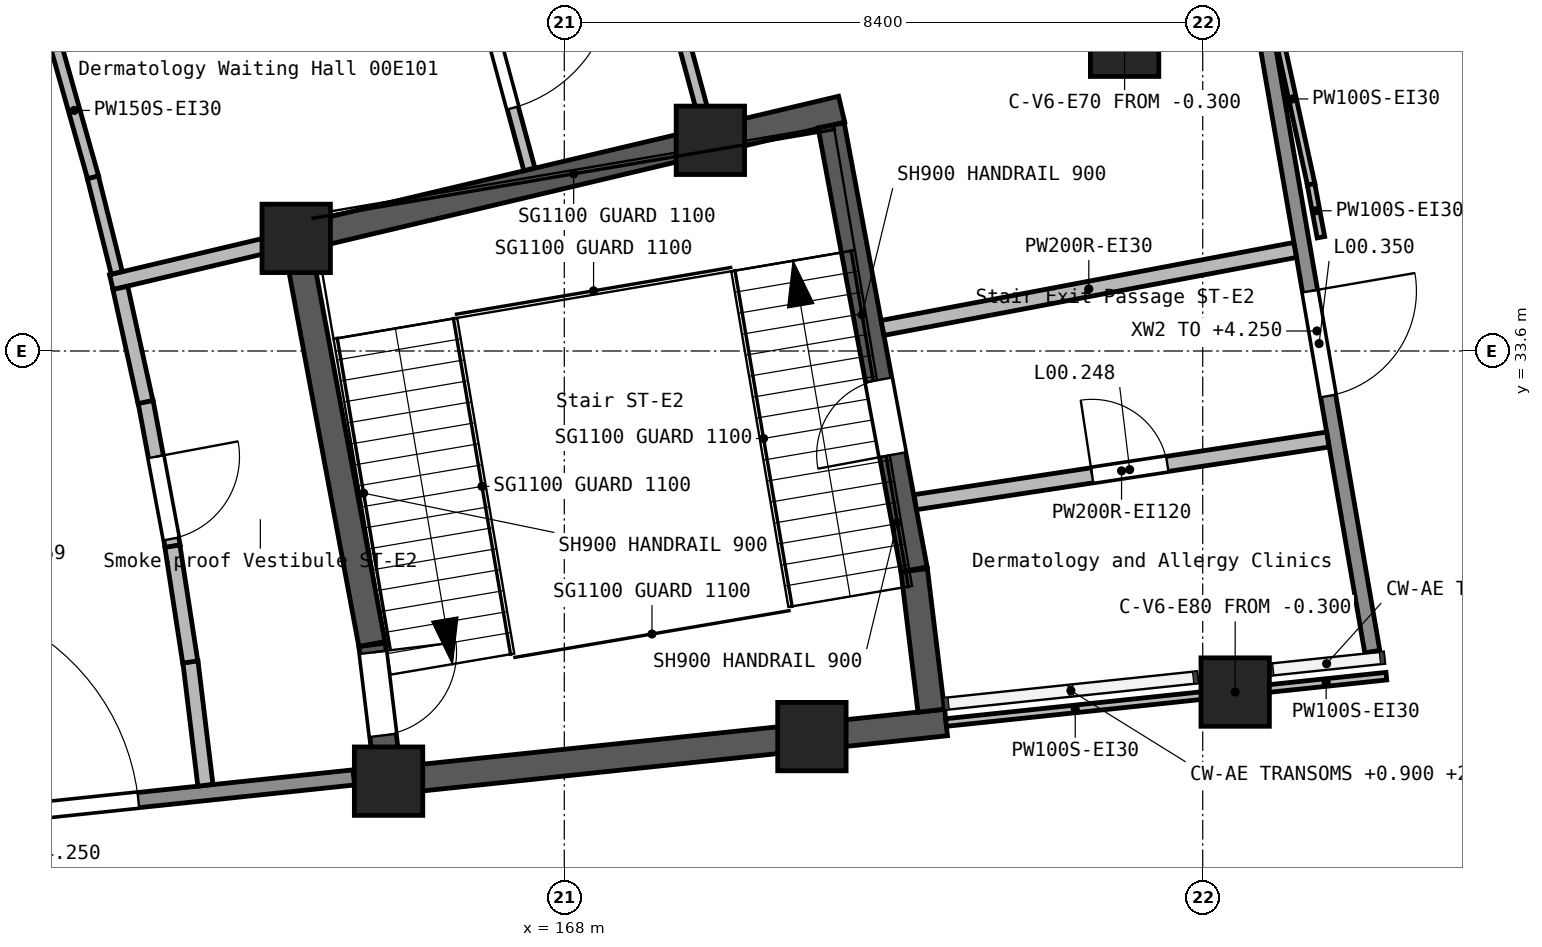
"""IFC4 building model, lengths in metres.
Left out: names, types, materials, properties, quantities, classifications, styles, units other than length and angle.
Written with IfcOpenShell. Run it as: python <this file> out.ifc"""

import sys

from ifc_helpers import new_model, si_unit, direction, frame, frame_2d, origin, origin_2d, place, context, subcontext, project, spatial, rectangle, extrude, element, fill, save


model = new_model("IFC4")
c1 = context("Model", 3, precision=1e-05, world=origin(), true_north=direction((0.0, 1.0)))
c2 = subcontext(c1, "Body", "Model", "MODEL_VIEW")
j1 = project(units=[si_unit("LENGTHUNIT", "METRE"), si_unit("PLANEANGLEUNIT", "RADIAN")], contexts=[c1])
p1 = place(None, origin())
s1 = spatial("IfcSite", under=j1, at=p1, CompositionType="ELEMENT")
p2 = place(p1, origin())
s2 = spatial("IfcBuilding", under=s1, at=p2, CompositionType="ELEMENT")
p3 = place(p2, origin())
s3 = spatial("IfcBuildingStorey", under=s2, at=p3, CompositionType="ELEMENT", Elevation=0.0)
for number, where, z_axis, x_axis in (
    (1, (164.473, 35.082, -0.3), (0.0, 0.0, 1.0), (1.0, 0.0, 0.0)),
    (2, (165.688, 27.941, -0.3), (0.0, 0.0, 1.0), (1.0, 0.0, 0.0)),
    (3, (169.922, 36.372, -0.3), (0.0, 0.0, 1.0), (1.0, 0.0, 0.0)),
    (4, (171.258, 28.527, -0.3), (0.0, 0.0, 1.0), (1.0, 0.0, 0.0)),
    (5, (175.372, 37.662, -0.3), (0.0, 0.0, 1.0), (1.0, 0.0, 0.0)),
    (6, (176.827, 29.113, -0.3), (0.0, 0.0, 1.0), (1.0, 0.0, 0.0)),
):
    element("IfcColumn", number, at=place(p3, frame(where, z_axis=z_axis, x_axis=x_axis)), inside=s3, PredefinedType="COLUMN", context=c2, shape_type="SweptSolid", body=[
        extrude(rectangle(XDim=0.9, YDim=0.9, at=origin_2d()), origin(), (0.0, 0.0, 1.0), 5.7),
    ])
p4 = place(p3, frame((164.303, 35.042, -0.3), z_axis=(0.0, 0.0, 1.0), x_axis=(0.973093454504, 0.230410782737, 0.0)))
e7 = element("IfcWall", 7, at=p4, inside=s3, PredefinedType="SHEAR", context=c2, shape_type="SweptSolid", body=[
    extrude(rectangle(XDim=7.55, YDim=0.35, at=frame_2d((3.775, 0.0))), origin(), (0.0, 0.0, 1.0), 5.7),
])
p5 = place(p3, frame((165.471, 29.734, -0.3), z_axis=(0.0, 0.0, 1.0), x_axis=(0.12025777275, -0.992742699844, 0.0)))
e8 = element("IfcWall", 8, at=p5, inside=s3, PredefinedType="SHEAR", context=c2, shape_type="SweptSolid", body=[
    extrude(rectangle(XDim=1.981, YDim=0.35, at=frame_2d((0.991, 0.0))), origin(), (0.0, 0.0, 1.0), 5.7),
])
p6 = place(p5, frame((0.1, 0.0, 0.3)))
e9 = element("IfcOpeningElement", 9, at=p6, cuts=e8, PredefinedType="OPENING", context=c2, shape_type="SweptSolid", body=[
    extrude(rectangle(XDim=1.1, YDim=2.1, at=frame_2d((0.55, 1.05))), frame((0.0, 0.185, 0.0), z_axis=(0.0, -1.0, 0.0), x_axis=(1.0, 0.0, 0.0)), (0.0, 0.0, 1.0), 0.37),
])
p7 = place(p3, frame((165.469, 29.746, -0.3), z_axis=(0.0, 0.0, 1.0), x_axis=(-0.183471964923, 0.98302494276, 0.0)))
e10 = element("IfcWall", 10, at=p7, inside=s3, PredefinedType="SHEAR", context=c2, shape_type="SweptSolid", body=[
    extrude(rectangle(XDim=5.253, YDim=0.35, at=frame_2d((2.627, 0.0))), origin(), (0.0, 0.0, 1.0), 5.7),
])
p8 = place(p3, frame((165.862, 27.959, -0.3), z_axis=(0.0, 0.0, 1.0), x_axis=(0.99451418157, 0.104601829128, 0.0)))
e11 = element("IfcWall", 11, at=p8, inside=s3, PredefinedType="SHEAR", context=c2, shape_type="SweptSolid", body=[
    extrude(rectangle(XDim=7.2, YDim=0.35, at=frame_2d((3.6, 0.0))), origin(), (0.0, 0.0, 1.0), 5.7),
])
p9 = place(p3, frame((172.604, 30.716, -0.3), z_axis=(0.0, 0.0, 1.0), x_axis=(0.120401871373, -0.992725233572, 0.0)))
e12 = element("IfcWall", 12, at=p9, inside=s3, PredefinedType="SHEAR", context=c2, shape_type="SweptSolid", body=[
    extrude(rectangle(XDim=1.861, YDim=0.35, at=frame_2d((0.931, 0.0))), origin(), (0.0, 0.0, 1.0), 5.7),
])
p10 = place(p3, frame((172.602, 30.727, -0.3), z_axis=(0.0, 0.0, 1.0), x_axis=(-0.18353204361, 0.983013727762, 0.0)))
e13 = element("IfcWall", 13, at=p10, inside=s3, PredefinedType="SHEAR", context=c2, shape_type="SweptSolid", body=[
    extrude(rectangle(XDim=5.944, YDim=0.35, at=frame_2d((2.972, 0.0))), origin(), (0.0, 0.0, 1.0), 5.7),
])
p11 = place(p10, frame((1.535, 0.0, 0.3)))
e14 = element("IfcOpeningElement", 14, at=p11, cuts=e13, PredefinedType="OPENING", context=c2, shape_type="SweptSolid", body=[
    extrude(rectangle(XDim=1.0, YDim=2.1, at=frame_2d((0.5, 1.05))), frame((0.0, 0.185, 0.0), z_axis=(0.0, -1.0, 0.0), x_axis=(1.0, 0.0, 0.0)), (0.0, 0.0, 1.0), 0.37),
])
p12 = place(p3, frame((156.578, 27.08, 0.0), z_axis=(0.0, 0.0, 1.0), x_axis=(0.994515443337, 0.10458983203, 0.0)))
e15 = element("IfcWall", 15, at=p12, inside=s3, PredefinedType="STANDARD", context=c2, shape_type="SweptSolid", body=[
    extrude(rectangle(XDim=8.7, YDim=0.2, at=frame_2d((4.35, 0.0))), origin(), (0.0, 0.0, 1.0), 4.25),
])
p13 = place(p12, frame((2.85, 0.0, 0.0)))
e16 = element("IfcOpeningElement", 16, at=p13, cuts=e15, PredefinedType="OPENING", context=c2, shape_type="SweptSolid", body=[
    extrude(rectangle(XDim=3.0, YDim=2.4, at=frame_2d((1.5, 1.2))), frame((0.0, 0.11, 0.0), z_axis=(0.0, -1.0, 0.0), x_axis=(1.0, 0.0, 0.0)), (0.0, 0.0, 1.0), 0.22),
])
p14 = place(p3, frame((177.174, 38.082, 0.0), z_axis=(0.0, 0.0, 1.0), x_axis=(0.17017618712, -0.985413651893, 0.0)))
e17 = element("IfcWall", 17, at=p14, inside=s3, PredefinedType="STANDARD", context=c2, shape_type="SweptSolid", body=[
    extrude(rectangle(XDim=8.562, YDim=0.2, at=frame_2d((4.281, 0.0))), origin(), (0.0, 0.0, 1.0), 4.25),
])
p15 = place(p14, frame((3.749, 0.0, 0.0)))
e18 = element("IfcOpeningElement", 18, at=p15, cuts=e17, PredefinedType="OPENING", context=c2, shape_type="SweptSolid", body=[
    extrude(rectangle(XDim=1.4, YDim=2.1, at=frame_2d((0.7, 1.05))), frame((0.0, 0.11, 0.0), z_axis=(0.0, -1.0, 0.0), x_axis=(1.0, 0.0, 0.0)), (0.0, 0.0, 1.0), 0.22),
])
p16 = place(p3, frame((172.618, 31.611, 0.0), z_axis=(0.0, 0.0, 1.0), x_axis=(0.988678146595, 0.150051732563, 0.0)))
e19 = element("IfcWall", 19, at=p16, inside=s3, PredefinedType="SOLIDWALL", context=c2, shape_type="SweptSolid", body=[
    extrude(rectangle(XDim=5.49, YDim=0.2, at=frame_2d((2.745, 0.0))), origin(), (0.0, 0.0, 1.0), 5.05),
])
p17 = place(p16, frame((2.353, 0.0, 0.0)))
e20 = element("IfcOpeningElement", 20, at=p17, cuts=e19, PredefinedType="OPENING", context=c2, shape_type="SweptSolid", body=[
    extrude(rectangle(XDim=1.0, YDim=2.1, at=frame_2d((0.5, 1.05))), frame((0.0, 0.11, 0.0), z_axis=(0.0, -1.0, 0.0), x_axis=(1.0, 0.0, 0.0)), (0.0, 0.0, 1.0), 0.22),
])
p18 = place(p3, frame((172.187, 33.904, 0.0), z_axis=(0.0, 0.0, 1.0), x_axis=(0.982623653884, 0.185609145325, 0.0)))
e21 = element("IfcWall", 21, at=p18, inside=s3, PredefinedType="SOLIDWALL", context=c2, shape_type="SweptSolid", body=[
    extrude(rectangle(XDim=5.524, YDim=0.2, at=frame_2d((2.762, 0.0))), origin(), (0.0, 0.0, 1.0), 5.05),
])
p19 = place(p3, frame((162.04, 34.506, 0.0), z_axis=(0.0, 0.0, 1.0), x_axis=(0.973117236519, 0.230310321066, 0.0)))
e22 = element("IfcWall", 22, at=p19, inside=s3, PredefinedType="SOLIDWALL", context=c2, shape_type="SweptSolid", body=[
    extrude(rectangle(XDim=2.066, YDim=0.2, at=frame_2d((1.033, 0.0))), origin(), (0.0, 0.0, 1.0), 5.05),
])
p20 = place(p3, frame((163.081, 29.512, 0.0), z_axis=(0.0, 0.0, 1.0), x_axis=(0.120326914639, -0.992734321767, 0.0)))
e23 = element("IfcWall", 23, at=p20, inside=s3, PredefinedType="SOLIDWALL", context=c2, shape_type="SweptSolid", body=[
    extrude(rectangle(XDim=1.637, YDim=0.2, at=frame_2d((0.819, 0.0))), origin(), (0.0, 0.0, 1.0), 5.05),
])
p21 = place(p3, frame((162.492, 32.932, 0.0), z_axis=(0.0, 0.0, 1.0), x_axis=(0.183778259652, -0.982967726469, 0.0)))
e24 = element("IfcWall", 24, at=p21, inside=s3, PredefinedType="SOLIDWALL", context=c2, shape_type="SweptSolid", body=[
    extrude(rectangle(XDim=1.936, YDim=0.2, at=frame_2d((0.968, 0.0))), origin(), (0.0, 0.0, 1.0), 5.05),
])
p22 = place(p21, frame((0.736, 0.0, 0.0)))
e25 = element("IfcOpeningElement", 25, at=p22, cuts=e24, PredefinedType="OPENING", context=c2, shape_type="SweptSolid", body=[
    extrude(rectangle(XDim=1.1, YDim=2.1, at=frame_2d((0.55, 1.05))), frame((0.0, 0.11, 0.0), z_axis=(0.0, -1.0, 0.0), x_axis=(1.0, 0.0, 0.0)), (0.0, 0.0, 1.0), 0.22),
])
p23 = place(p3, frame((162.159, 34.43, 0.0), z_axis=(0.0, 0.0, 1.0), x_axis=(0.215079958229, -0.976596442533, 0.0)))
e26 = element("IfcWall", 26, at=p23, inside=s3, PredefinedType="SOLIDWALL", context=c2, shape_type="SweptSolid", body=[
    extrude(rectangle(XDim=1.537, YDim=0.2, at=frame_2d((0.769, 0.0))), origin(), (0.0, 0.0, 1.0), 5.05),
])
p24 = place(p3, frame((162.844, 31.032, 0.0), z_axis=(0.0, 0.0, 1.0), x_axis=(0.152211909299, -0.9883478814, 0.0)))
e27 = element("IfcWall", 27, at=p24, inside=s3, PredefinedType="SOLIDWALL", context=c2, shape_type="SweptSolid", body=[
    extrude(rectangle(XDim=1.542, YDim=0.2, at=frame_2d((0.771, 0.0))), origin(), (0.0, 0.0, 1.0), 5.05),
])
p25 = place(p3, frame((168.862, 40.287, 0.0), z_axis=(0.0, 0.0, 1.0), x_axis=(0.261268938462, -0.965266047157, 0.0)))
e28 = element("IfcWall", 28, at=p25, inside=s3, PredefinedType="PARTITIONING", context=c2, shape_type="SweptSolid", body=[
    extrude(rectangle(XDim=3.622, YDim=0.15, at=frame_2d((1.811, 0.0))), origin(), (0.0, 0.0, 1.0), 5.05),
])
p26 = place(p25, frame((1.566, 0.0, 0.0)))
e29 = element("IfcOpeningElement", 29, at=p26, cuts=e28, PredefinedType="OPENING", context=c2, shape_type="SweptSolid", body=[
    extrude(rectangle(XDim=1.0, YDim=2.1, at=frame_2d((0.5, 1.05))), frame((0.0, 0.085, 0.0), z_axis=(0.0, -1.0, 0.0), x_axis=(1.0, 0.0, 0.0)), (0.0, 0.0, 1.0), 0.17),
])
p27 = place(p3, frame((166.567, 39.586, 0.0), z_axis=(0.0, 0.0, 1.0), x_axis=(0.261225938755, -0.965277684877, 0.0)))
e30 = element("IfcWall", 30, at=p27, inside=s3, PredefinedType="PARTITIONING", context=c2, shape_type="SweptSolid", body=[
    extrude(rectangle(XDim=3.725, YDim=0.15, at=frame_2d((1.863, 0.0))), origin(), (0.0, 0.0, 1.0), 5.05),
])
p28 = place(p27, frame((1.089, 0.0, 0.0)))
e31 = element("IfcOpeningElement", 31, at=p28, cuts=e30, PredefinedType="OPENING", context=c2, shape_type="SweptSolid", body=[
    extrude(rectangle(XDim=1.8, YDim=2.1, at=frame_2d((0.9, 1.05))), frame((0.0, 0.085, 0.0), z_axis=(0.0, -1.0, 0.0), x_axis=(1.0, 0.0, 0.0)), (0.0, 0.0, 1.0), 0.17),
])
p29 = place(p3, frame((161.302, 37.647, 0.0), z_axis=(0.0, 0.0, 1.0), x_axis=(0.271536076628, -0.962428261789, 0.0)))
e32 = element("IfcWall", 32, at=p29, inside=s3, PredefinedType="PARTITIONING", context=c2, shape_type="SweptSolid", body=[
    extrude(rectangle(XDim=1.833, YDim=0.15, at=frame_2d((0.917, 0.0))), origin(), (0.0, 0.0, 1.0), 5.05),
])
p30 = place(p3, frame((161.798, 35.884, 0.0), z_axis=(0.0, 0.0, 1.0), x_axis=(0.243023571224, -0.970020383203, 0.0)))
e33 = element("IfcWall", 33, at=p30, inside=s3, PredefinedType="PARTITIONING", context=c2, shape_type="SweptSolid", body=[
    extrude(rectangle(XDim=1.295, YDim=0.15, at=frame_2d((0.647, 0.0))), origin(), (0.0, 0.0, 1.0), 5.05),
])
p31 = place(p3, frame((173.023, 28.712, 0.0), z_axis=(0.0, 0.0, 1.0), x_axis=(0.994508975148, 0.104651317957, 0.0)))
e34 = element("IfcWall", 34, at=p31, inside=s3, PredefinedType="PARTITIONING", context=c2, shape_type="SweptSolid", body=[
    extrude(rectangle(XDim=3.418, YDim=0.1, at=frame_2d((1.709, 0.0))), origin(), (0.0, 0.0, 1.0), 5.05),
])
p32 = place(p3, frame((177.232, 29.155, 0.0), z_axis=(0.0, 0.0, 1.0), x_axis=(0.994502932517, 0.104708725591, 0.0)))
e35 = element("IfcWall", 35, at=p32, inside=s3, PredefinedType="PARTITIONING", context=c2, shape_type="SweptSolid", body=[
    extrude(rectangle(XDim=1.593, YDim=0.1, at=frame_2d((0.796, 0.0))), origin(), (0.0, 0.0, 1.0), 5.05),
])
p33 = place(p3, frame((177.336, 38.04, 0.0), z_axis=(0.0, 0.0, 1.0), x_axis=(0.213187334012, -0.977011341089, 0.0)))
e36 = element("IfcWall", 36, at=p33, inside=s3, PredefinedType="PARTITIONING", context=c2, shape_type="SweptSolid", body=[
    extrude(rectangle(XDim=2.301, YDim=0.1, at=frame_2d((1.15, 0.0))), origin(), (0.0, 0.0, 1.0), 5.05),
])
p34 = place(p3, frame((177.825, 35.793, 0.0), z_axis=(0.0, 0.0, 1.0), x_axis=(0.184038826222, -0.982918974505, 0.0)))
e37 = element("IfcWall", 37, at=p34, inside=s3, PredefinedType="PARTITIONING", context=c2, shape_type="SweptSolid", body=[
    extrude(rectangle(XDim=0.708, YDim=0.1, at=frame_2d((0.354, 0.0))), origin(), (0.0, 0.0, 1.0), 5.05),
])
p35 = place(p13, frame((3.0, 0.0, 0.0), z_axis=(0.0, 0.0, 1.0), x_axis=(-1.0, 0.0, 0.0)))
e38 = element("IfcDoor", 38, at=p35, inside=s3, OperationType="SINGLE_SWING_LEFT", PredefinedType="DOOR", context=c2, shape_type="SweptSolid", body=[
    extrude(rectangle(XDim=3.0, YDim=2.4, at=frame_2d((1.5, 1.2))), frame((0.0, 0.025, 0.0), z_axis=(0.0, -1.0, 0.0), x_axis=(1.0, 0.0, 0.0)), (0.0, 0.0, 1.0), 0.05),
])
fill(e16, e38)
p36 = place(p15, origin())
e39 = element("IfcDoor", 39, at=p36, inside=s3, OperationType="SINGLE_SWING_LEFT", PredefinedType="DOOR", context=c2, shape_type="SweptSolid", body=[
    extrude(rectangle(XDim=1.4, YDim=2.1, at=frame_2d((0.7, 1.05))), frame((0.0, 0.025, 0.0), z_axis=(0.0, -1.0, 0.0), x_axis=(1.0, 0.0, 0.0)), (0.0, 0.0, 1.0), 0.05),
])
fill(e18, e39)
p37 = place(p28, origin())
e40 = element("IfcDoor", 40, at=p37, inside=s3, OperationType="DOUBLE_DOOR_SINGLE_SWING", PredefinedType="DOOR", context=c2, shape_type="SweptSolid", body=[
    extrude(rectangle(XDim=1.8, YDim=2.1, at=frame_2d((0.9, 1.05))), frame((0.0, 0.025, 0.0), z_axis=(0.0, -1.0, 0.0), x_axis=(1.0, 0.0, 0.0)), (0.0, 0.0, 1.0), 0.05),
])
fill(e31, e40)
p38 = place(p11, frame((1.0, 0.0, 0.0), z_axis=(0.0, 0.0, 1.0), x_axis=(-1.0, 0.0, 0.0)))
e41 = element("IfcDoor", 41, at=p38, inside=s3, OperationType="SINGLE_SWING_RIGHT", PredefinedType="DOOR", context=c2, shape_type="SweptSolid", body=[
    extrude(rectangle(XDim=1.0, YDim=2.1, at=frame_2d((0.5, 1.05))), frame((0.0, 0.025, 0.0), z_axis=(0.0, -1.0, 0.0), x_axis=(1.0, 0.0, 0.0)), (0.0, 0.0, 1.0), 0.05),
])
fill(e14, e41)
p39 = place(p17, origin())
e42 = element("IfcDoor", 42, at=p39, inside=s3, OperationType="SINGLE_SWING_RIGHT", PredefinedType="DOOR", context=c2, shape_type="SweptSolid", body=[
    extrude(rectangle(XDim=1.0, YDim=2.1, at=frame_2d((0.5, 1.05))), frame((0.0, 0.025, 0.0), z_axis=(0.0, -1.0, 0.0), x_axis=(1.0, 0.0, 0.0)), (0.0, 0.0, 1.0), 0.05),
])
fill(e20, e42)
p40 = place(p6, origin())
e43 = element("IfcDoor", 43, at=p40, inside=s3, OperationType="SINGLE_SWING_LEFT", PredefinedType="DOOR", context=c2, shape_type="SweptSolid", body=[
    extrude(rectangle(XDim=1.1, YDim=2.1, at=frame_2d((0.55, 1.05))), frame((0.0, 0.025, 0.0), z_axis=(0.0, -1.0, 0.0), x_axis=(1.0, 0.0, 0.0)), (0.0, 0.0, 1.0), 0.05),
])
fill(e9, e43)
p41 = place(p22, origin())
e44 = element("IfcDoor", 44, at=p41, inside=s3, OperationType="SINGLE_SWING_RIGHT", PredefinedType="DOOR", context=c2, shape_type="SweptSolid", body=[
    extrude(rectangle(XDim=1.1, YDim=2.1, at=frame_2d((0.55, 1.05))), frame((0.0, 0.025, 0.0), z_axis=(0.0, -1.0, 0.0), x_axis=(1.0, 0.0, 0.0)), (0.0, 0.0, 1.0), 0.05),
])
fill(e25, e44)
save(model, sys.argv[1])
